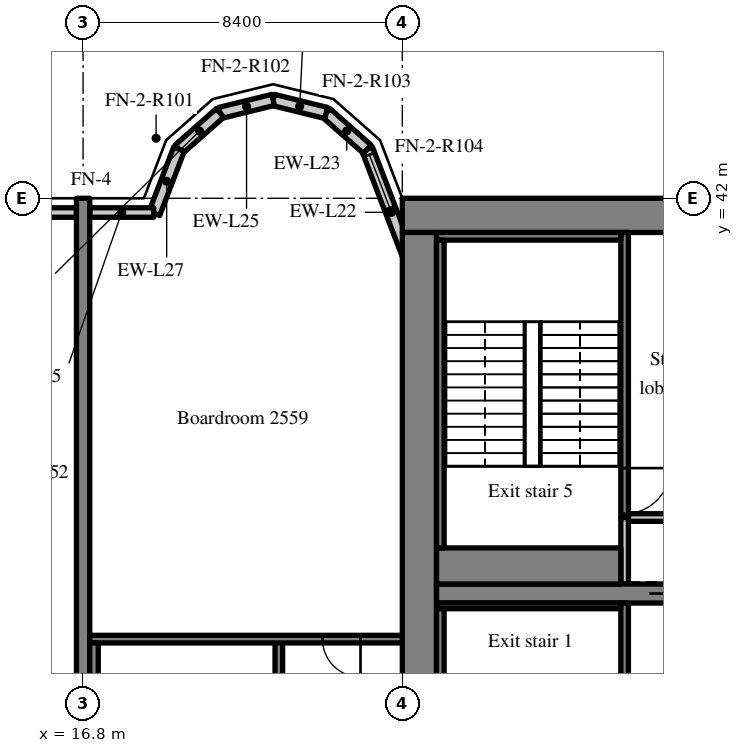
"""IFC4 building model, lengths in metres.
Left out: names, types, materials, properties, quantities, classifications, styles, units other than length and angle.
Written with IfcOpenShell. Run it as: python <this file> out.ifc"""

import sys

from ifc_helpers import new_model, si_unit, direction, frame, frame_2d, origin, place, context, subcontext, project, spatial, rectangle, extrude, source, transform, mapped, element, fill, save


model = new_model("IFC4")
c1 = context("Model", 3, precision=1e-05, world=origin(), true_north=direction((0.0, 1.0)))
c2 = subcontext(c1, "Body", "Model", "MODEL_VIEW")
j1 = project(units=[si_unit("LENGTHUNIT", "METRE"), si_unit("PLANEANGLEUNIT", "RADIAN")], contexts=[c1])
p1 = place(None, origin())
s1 = spatial("IfcSite", under=j1, at=p1, CompositionType="ELEMENT")
p2 = place(p1, origin())
s2 = spatial("IfcBuilding", under=s1, at=p2, CompositionType="ELEMENT")
p3 = place(p2, frame((0.0, 0.0, 106.6)))
s3 = spatial("IfcBuildingStorey", under=s2, at=p3, CompositionType="ELEMENT", Elevation=106.6)
m1 = source(origin(), c2, "Body", "SweptSolid", [
    extrude(rectangle(XDim=50.4, YDim=0.9, at=frame_2d((25.2, 0.0))), origin(), (0.0, 0.0, 1.0), 3.52),
])
p4 = place(p3, frame((25.2, 41.55, 0.0), z_axis=(0.0, 0.0, 1.0), x_axis=(1.0, 0.0, 0.0)))
e1 = element("IfcWall", 1, at=p4, inside=s3, PredefinedType="SHEAR", context=c2, shape_type="MappedRepresentation", body=[
    mapped(m1, transform((0.0, 0.0, 0.0), scale=1.0)),
])
m2 = source(origin(), c2, "Body", "SweptSolid", [
    extrude(rectangle(XDim=18.2, YDim=0.9, at=frame_2d((9.1, 0.0))), origin(), (0.0, 0.0, 1.0), 3.52),
])
p5 = place(p3, frame((25.65, 22.9, 0.0), z_axis=(0.0, 0.0, 1.0), x_axis=(0.0, 1.0, 0.0)))
e2 = element("IfcWall", 2, at=p5, inside=s3, PredefinedType="SHEAR", context=c2, shape_type="MappedRepresentation", body=[
    mapped(m2, transform((0.0, 0.0, 0.0), scale=1.0)),
])
m3 = source(origin(), c2, "Body", "SweptSolid", [
    extrude(rectangle(XDim=7.25, YDim=0.5, at=frame_2d((3.625, 0.0))), origin(), (0.0, 0.0, 1.0), 3.52),
])
p6 = place(p3, frame((26.1, 31.6, 0.0), z_axis=(0.0, 0.0, 1.0), x_axis=(1.0, 0.0, 0.0)))
e3 = element("IfcWall", 3, at=p6, inside=s3, PredefinedType="SHEAR", context=c2, shape_type="MappedRepresentation", body=[
    mapped(m3, transform((0.0, 0.0, 0.0), scale=1.0)),
])
m4 = source(origin(), c2, "Body", "SweptSolid", [
    extrude(rectangle(XDim=1.1, YDim=2.1, at=frame_2d((0.55, 1.05))), frame((0.0, 0.26, 0.0), z_axis=(0.0, -1.0, 0.0), x_axis=(1.0, 0.0, 0.0)), (0.0, 0.0, 1.0), 0.52),
])
p7 = place(p6, frame((5.6, 0.0, 0.0)))
e4 = element("IfcOpeningElement", 4, at=p7, cuts=e3, PredefinedType="OPENING", context=c2, shape_type="MappedRepresentation", body=[
    mapped(m4, transform((0.0, 0.0, 0.0), scale=1.0)),
])
m5 = source(origin(), c2, "Body", "SweptSolid", [
    extrude(rectangle(XDim=20.0, YDim=0.35, at=frame_2d((10.0, 0.0))), origin(), (0.0, 0.0, 1.0), 3.52),
])
p8 = place(p3, frame((16.8, 22.0, 0.0), z_axis=(0.0, 0.0, 1.0), x_axis=(0.0, 1.0, 0.0)))
e5 = element("IfcWall", 5, at=p8, inside=s3, PredefinedType="SHEAR", context=c2, shape_type="MappedRepresentation", body=[
    mapped(m5, transform((0.0, 0.0, 0.0), scale=1.0)),
])
m6 = source(origin(), c2, "Body", "SweptSolid", [
    extrude(rectangle(XDim=3.559, YDim=0.3, at=frame_2d((1.78, 0.0))), origin(), (0.0, 0.0, 1.0), 3.52),
])
p9 = place(p3, frame((25.55, 39.969, 0.0), z_axis=(0.0, 0.0, 1.0), x_axis=(-0.35779745313, 0.933799219604, 0.0)))
e6 = element("IfcWall", 6, at=p9, inside=s3, PredefinedType="SOLIDWALL", context=c2, shape_type="MappedRepresentation", body=[
    mapped(m6, transform((0.0, 0.0, 0.0), scale=1.0)),
])
m7 = source(origin(), c2, "Body", "SweptSolid", [
    extrude(rectangle(XDim=1.5, YDim=2.0, at=frame_2d((0.75, 1.0))), frame((0.0, 0.16, 0.0), z_axis=(0.0, -1.0, 0.0), x_axis=(1.0, 0.0, 0.0)), (0.0, 0.0, 1.0), 0.32),
])
p10 = place(p9, frame((1.903, 0.0, 0.9)))
e7 = element("IfcOpeningElement", 7, at=p10, cuts=e6, PredefinedType="OPENING", context=c2, shape_type="MappedRepresentation", body=[
    mapped(m7, transform((0.0, 0.0, 0.0), scale=1.0)),
])
m8 = source(origin(), c2, "Body", "SweptSolid", [
    extrude(rectangle(XDim=1.44, YDim=0.3, at=frame_2d((0.72, 0.0))), origin(), (0.0, 0.0, 1.0), 3.52),
])
p11 = place(p3, frame((24.277, 43.292, 0.0), z_axis=(0.0, 0.0, 1.0), x_axis=(-0.749649827867, 0.661834673902, 0.0)))
e8 = element("IfcWall", 8, at=p11, inside=s3, PredefinedType="SOLIDWALL", context=c2, shape_type="MappedRepresentation", body=[
    mapped(m8, transform((0.0, 0.0, 0.0), scale=1.0)),
])
m9 = source(origin(), c2, "Body", "SweptSolid", [
    extrude(rectangle(XDim=1.438, YDim=0.3, at=frame_2d((0.719, 0.0))), origin(), (0.0, 0.0, 1.0), 3.52),
])
p12 = place(p3, frame((23.197, 44.245, 0.0), z_axis=(0.0, 0.0, 1.0), x_axis=(-0.971152283879, 0.238460146601, 0.0)))
e9 = element("IfcWall", 9, at=p12, inside=s3, PredefinedType="SOLIDWALL", context=c2, shape_type="MappedRepresentation", body=[
    mapped(m9, transform((0.0, 0.0, 0.0), scale=1.0)),
])
m10 = source(origin(), c2, "Body", "SweptSolid", [
    extrude(rectangle(XDim=1.439, YDim=0.3, at=frame_2d((0.719, 0.0))), origin(), (0.0, 0.0, 1.0), 3.52),
])
p13 = place(p3, frame((21.8, 44.588, 0.0), z_axis=(0.0, 0.0, 1.0), x_axis=(-0.971161932466, -0.238420848351, 0.0)))
e10 = element("IfcWall", 10, at=p13, inside=s3, PredefinedType="SOLIDWALL", context=c2, shape_type="MappedRepresentation", body=[
    mapped(m10, transform((0.0, 0.0, 0.0), scale=1.0)),
])
m11 = source(origin(), c2, "Body", "SweptSolid", [
    extrude(rectangle(XDim=1.44, YDim=0.3, at=frame_2d((0.72, 0.0))), origin(), (0.0, 0.0, 1.0), 3.52),
])
p14 = place(p3, frame((20.403, 44.245, 0.0), z_axis=(0.0, 0.0, 1.0), x_axis=(-0.74957555648, -0.661918790432, 0.0)))
e11 = element("IfcWall", 11, at=p14, inside=s3, PredefinedType="SOLIDWALL", context=c2, shape_type="MappedRepresentation", body=[
    mapped(m11, transform((0.0, 0.0, 0.0), scale=1.0)),
])
m12 = source(origin(), c2, "Body", "SweptSolid", [
    extrude(rectangle(XDim=1.812, YDim=0.3, at=frame_2d((0.906, 0.0))), origin(), (0.0, 0.0, 1.0), 3.52),
])
p15 = place(p3, frame((19.323, 43.292, 0.0), z_axis=(0.0, 0.0, 1.0), x_axis=(-0.357877270961, -0.93376863244, 0.0)))
e12 = element("IfcWall", 12, at=p15, inside=s3, PredefinedType="SOLIDWALL", context=c2, shape_type="MappedRepresentation", body=[
    mapped(m12, transform((0.0, 0.0, 0.0), scale=1.0)),
])
m13 = source(origin(), c2, "Body", "SweptSolid", [
    extrude(rectangle(XDim=3.675, YDim=0.25, at=frame_2d((1.837, 0.0))), origin(), (0.0, 0.0, 1.0), 2.82),
])
p16 = place(p3, frame((16.625, 41.625, 0.0), z_axis=(0.0, 0.0, 1.0), x_axis=(-1.0, 0.0, 0.0)))
e13 = element("IfcWall", 13, at=p16, inside=s3, PredefinedType="SOLIDWALL", context=c2, shape_type="MappedRepresentation", body=[
    mapped(m13, transform((0.0, 0.0, 0.0), scale=1.0)),
])
m14 = source(origin(), c2, "Body", "SweptSolid", [
    extrude(rectangle(XDim=1.5, YDim=1.5, at=frame_2d((0.75, 0.75))), frame((0.0, 0.135, 0.0), z_axis=(0.0, -1.0, 0.0), x_axis=(1.0, 0.0, 0.0)), (0.0, 0.0, 1.0), 0.27),
])
p17 = place(p16, frame((1.087, 0.0, 0.9)))
e14 = element("IfcOpeningElement", 14, at=p17, cuts=e13, PredefinedType="OPENING", context=c2, shape_type="MappedRepresentation", body=[
    mapped(m14, transform((0.0, 0.0, 0.0), scale=1.0)),
])
m15 = source(origin(), c2, "Body", "SweptSolid", [
    extrude(rectangle(XDim=1.683, YDim=0.25, at=frame_2d((0.841, 0.0))), origin(), (0.0, 0.0, 1.0), 2.82),
])
p18 = place(p3, frame((18.658, 41.625, 0.0), z_axis=(0.0, 0.0, 1.0), x_axis=(-1.0, 0.0, 0.0)))
e15 = element("IfcWall", 15, at=p18, inside=s3, PredefinedType="SOLIDWALL", context=c2, shape_type="MappedRepresentation", body=[
    mapped(m15, transform((0.0, 0.0, 0.0), scale=1.0)),
])
m16 = source(origin(), c2, "Body", "SweptSolid", [
    extrude(rectangle(XDim=8.45, YDim=0.2, at=frame_2d((4.225, 0.0))), origin(), (0.0, 0.0, 1.0), 3.52),
])
p19 = place(p3, frame((31.05, 22.9, 0.0), z_axis=(0.0, 0.0, 1.0), x_axis=(0.0, 1.0, 0.0)))
e16 = element("IfcWall", 16, at=p19, inside=s3, PredefinedType="SOLIDWALL", context=c2, shape_type="MappedRepresentation", body=[
    mapped(m16, transform((0.0, 0.0, 0.0), scale=1.0)),
])
m17 = source(origin(), c2, "Body", "SweptSolid", [
    extrude(rectangle(XDim=1.2, YDim=2.1, at=frame_2d((0.6, 1.05))), frame((0.0, 0.11, 0.0), z_axis=(0.0, -1.0, 0.0), x_axis=(1.0, 0.0, 0.0)), (0.0, 0.0, 1.0), 0.22),
])
p20 = place(p19, frame((0.7, 0.0, 0.0)))
e17 = element("IfcOpeningElement", 17, at=p20, cuts=e16, PredefinedType="OPENING", context=c2, shape_type="MappedRepresentation", body=[
    mapped(m17, transform((0.0, 0.0, 0.0), scale=1.0)),
])
m18 = source(origin(), c2, "Body", "SweptSolid", [
    extrude(rectangle(XDim=1.75, YDim=0.2, at=frame_2d((0.875, 0.0))), origin(), (0.0, 0.0, 1.0), 3.52),
])
p21 = place(p3, frame((31.05, 31.85, 0.0), z_axis=(0.0, 0.0, 1.0), x_axis=(0.0, 1.0, 0.0)))
e18 = element("IfcWall", 18, at=p21, inside=s3, PredefinedType="SOLIDWALL", context=c2, shape_type="MappedRepresentation", body=[
    mapped(m18, transform((0.0, 0.0, 0.0), scale=1.0)),
])
m19 = source(origin(), c2, "Body", "SweptSolid", [
    extrude(rectangle(XDim=2.2, YDim=0.2, at=frame_2d((1.1, 0.0))), origin(), (0.0, 0.0, 1.0), 3.52),
])
p22 = place(p3, frame((31.15, 33.6, 0.0), z_axis=(0.0, 0.0, 1.0), x_axis=(1.0, 0.0, 0.0)))
e19 = element("IfcWall", 19, at=p22, inside=s3, PredefinedType="SOLIDWALL", context=c2, shape_type="MappedRepresentation", body=[
    mapped(m19, transform((0.0, 0.0, 0.0), scale=1.0)),
])
m20 = source(origin(), c2, "Body", "SweptSolid", [
    extrude(rectangle(XDim=7.5, YDim=0.2, at=frame_2d((3.75, 0.0))), origin(), (0.0, 0.0, 1.0), 3.52),
])
p23 = place(p3, frame((31.05, 33.6, 0.0), z_axis=(0.0, 0.0, 1.0), x_axis=(0.0, 1.0, 0.0)))
e20 = element("IfcWall", 20, at=p23, inside=s3, PredefinedType="SOLIDWALL", context=c2, shape_type="MappedRepresentation", body=[
    mapped(m20, transform((0.0, 0.0, 0.0), scale=1.0)),
])
p24 = place(p23, frame((0.1, 0.0, 0.0)))
e21 = element("IfcOpeningElement", 21, at=p24, cuts=e20, PredefinedType="OPENING", context=c2, shape_type="MappedRepresentation", body=[
    mapped(m17, transform((0.0, 0.0, 0.0), scale=1.0)),
])
m21 = source(origin(), c2, "Body", "SweptSolid", [
    extrude(rectangle(XDim=8.3, YDim=0.2, at=frame_2d((4.15, 0.0))), origin(), (0.0, 0.0, 1.0), 3.52),
])
p25 = place(p3, frame((21.95, 22.1, 0.0), z_axis=(0.0, 0.0, 1.0), x_axis=(0.0, 1.0, 0.0)))
e22 = element("IfcWall", 22, at=p25, inside=s3, PredefinedType="SOLIDWALL", context=c2, shape_type="MappedRepresentation", body=[
    mapped(m21, transform((0.0, 0.0, 0.0), scale=1.0)),
])
p26 = place(p25, frame((0.6, 0.0, 0.0)))
e23 = element("IfcOpeningElement", 23, at=p26, cuts=e22, PredefinedType="OPENING", context=c2, shape_type="MappedRepresentation", body=[
    mapped(m17, transform((0.0, 0.0, 0.0), scale=1.0)),
])
m22 = source(origin(), c2, "Body", "SweptSolid", [
    extrude(rectangle(XDim=8.225, YDim=0.2, at=frame_2d((4.112, 0.0))), origin(), (0.0, 0.0, 1.0), 3.52),
])
p27 = place(p3, frame((16.975, 30.4, 0.0), z_axis=(0.0, 0.0, 1.0), x_axis=(1.0, 0.0, 0.0)))
e24 = element("IfcWall", 24, at=p27, inside=s3, PredefinedType="SOLIDWALL", context=c2, shape_type="MappedRepresentation", body=[
    mapped(m22, transform((0.0, 0.0, 0.0), scale=1.0)),
])
m23 = source(origin(), c2, "Body", "SweptSolid", [
    extrude(rectangle(XDim=1.0, YDim=2.1, at=frame_2d((0.5, 1.05))), frame((0.0, 0.11, 0.0), z_axis=(0.0, -1.0, 0.0), x_axis=(1.0, 0.0, 0.0)), (0.0, 0.0, 1.0), 0.22),
])
p28 = place(p27, frame((6.125, 0.0, 0.0)))
e25 = element("IfcOpeningElement", 25, at=p28, cuts=e24, PredefinedType="OPENING", context=c2, shape_type="MappedRepresentation", body=[
    mapped(m23, transform((0.0, 0.0, 0.0), scale=1.0)),
])
m24 = source(origin(), c2, "Body", "SweptSolid", [
    extrude(rectangle(XDim=4.85, YDim=0.15, at=frame_2d((2.425, 0.0))), origin(), (0.0, 0.0, 1.0), 3.52),
])
p29 = place(p3, frame((26.1, 31.275, 0.0), z_axis=(0.0, 0.0, 1.0), x_axis=(1.0, 0.0, 0.0)))
e26 = element("IfcWall", 26, at=p29, inside=s3, PredefinedType="SOLIDWALL", context=c2, shape_type="MappedRepresentation", body=[
    mapped(m24, transform((0.0, 0.0, 0.0), scale=1.0)),
])
m25 = source(origin(), c2, "Body", "SweptSolid", [
    extrude(rectangle(XDim=8.1, YDim=0.2, at=frame_2d((4.05, 0.0))), origin(), (0.0, 0.0, 1.0), 3.52),
])
p30 = place(p3, frame((26.2, 23.1, 0.0), z_axis=(0.0, 0.0, 1.0), x_axis=(0.0, 1.0, 0.0)))
e27 = element("IfcWall", 27, at=p30, inside=s3, PredefinedType="SOLIDWALL", context=c2, shape_type="MappedRepresentation", body=[
    mapped(m25, transform((0.0, 0.0, 0.0), scale=1.0)),
])
m26 = source(origin(), c2, "Body", "SweptSolid", [
    extrude(rectangle(XDim=8.1, YDim=0.225, at=frame_2d((4.05, 0.0))), origin(), (0.0, 0.0, 1.0), 3.52),
])
p31 = place(p3, frame((17.087, 22.2, 0.0), z_axis=(0.0, 0.0, 1.0), x_axis=(0.0, 1.0, 0.0)))
e28 = element("IfcWall", 28, at=p31, inside=s3, PredefinedType="SOLIDWALL", context=c2, shape_type="MappedRepresentation", body=[
    mapped(m26, transform((0.0, 0.0, 0.0), scale=1.0)),
])
m27 = source(origin(), c2, "Body", "SweptSolid", [
    extrude(rectangle(XDim=4.85, YDim=0.2, at=frame_2d((2.425, 0.0))), origin(), (0.0, 0.0, 1.0), 3.52),
])
p32 = place(p3, frame((26.1, 41.0, 0.0), z_axis=(0.0, 0.0, 1.0), x_axis=(1.0, 0.0, 0.0)))
e29 = element("IfcWall", 29, at=p32, inside=s3, PredefinedType="SOLIDWALL", context=c2, shape_type="MappedRepresentation", body=[
    mapped(m27, transform((0.0, 0.0, 0.0), scale=1.0)),
])
m28 = source(origin(), c2, "Body", "SweptSolid", [
    extrude(rectangle(XDim=4.85, YDim=0.95, at=frame_2d((2.425, 0.0))), origin(), (0.0, 0.0, 1.0), 3.52),
])
p33 = place(p3, frame((26.1, 32.325, 0.0), z_axis=(0.0, 0.0, 1.0), x_axis=(1.0, 0.0, 0.0)))
e30 = element("IfcWall", 30, at=p33, inside=s3, PredefinedType="SOLIDWALL", context=c2, shape_type="MappedRepresentation", body=[
    mapped(m28, transform((0.0, 0.0, 0.0), scale=1.0)),
])
p34 = place(p3, frame((26.2, 32.8, 0.0), z_axis=(0.0, 0.0, 1.0), x_axis=(0.0, 1.0, 0.0)))
e31 = element("IfcWall", 31, at=p34, inside=s3, PredefinedType="SOLIDWALL", context=c2, shape_type="MappedRepresentation", body=[
    mapped(m25, transform((0.0, 0.0, 0.0), scale=1.0)),
])
m29 = source(origin(), c2, "Body", "SweptSolid", [
    extrude(rectangle(XDim=1.5, YDim=2.0, at=frame_2d((0.75, 1.0))), frame((0.0, 0.03, 0.0), z_axis=(0.0, -1.0, 0.0), x_axis=(1.0, 0.0, 0.0)), (0.0, 0.0, 1.0), 0.06),
])
p35 = place(p10, origin())
e32 = element("IfcWindow", 32, at=p35, inside=s3, PartitioningType="SINGLE_PANEL", PredefinedType="WINDOW", context=c2, shape_type="MappedRepresentation", body=[
    mapped(m29, transform((0.0, 0.0, 0.0), scale=1.0)),
])
fill(e7, e32)
m30 = source(origin(), c2, "Body", "SweptSolid", [
    extrude(rectangle(XDim=1.1, YDim=2.1, at=frame_2d((0.55, 1.05))), frame((0.0, 0.025, 0.0), z_axis=(0.0, -1.0, 0.0), x_axis=(1.0, 0.0, 0.0)), (0.0, 0.0, 1.0), 0.05),
])
p36 = place(p7, origin())
e33 = element("IfcDoor", 33, at=p36, inside=s3, OperationType="SLIDING_TO_RIGHT", PredefinedType="DOOR", context=c2, shape_type="MappedRepresentation", body=[
    mapped(m30, transform((0.0, 0.0, 0.0), scale=1.0)),
])
fill(e4, e33)
m31 = source(origin(), c2, "Body", "SweptSolid", [
    extrude(rectangle(XDim=1.2, YDim=2.1, at=frame_2d((0.6, 1.05))), frame((0.0, 0.025, 0.0), z_axis=(0.0, -1.0, 0.0), x_axis=(1.0, 0.0, 0.0)), (0.0, 0.0, 1.0), 0.05),
])
p37 = place(p24, origin())
e34 = element("IfcDoor", 34, at=p37, inside=s3, OperationType="SINGLE_SWING_RIGHT", PredefinedType="DOOR", context=c2, shape_type="MappedRepresentation", body=[
    mapped(m31, transform((0.0, 0.0, 0.0), scale=1.0)),
])
fill(e21, e34)
m32 = source(origin(), c2, "Body", "SweptSolid", [
    extrude(rectangle(XDim=1.0, YDim=2.1, at=frame_2d((0.5, 1.05))), frame((0.0, 0.025, 0.0), z_axis=(0.0, -1.0, 0.0), x_axis=(1.0, 0.0, 0.0)), (0.0, 0.0, 1.0), 0.05),
])
p38 = place(p28, origin())
e35 = element("IfcDoor", 35, at=p38, inside=s3, OperationType="SINGLE_SWING_RIGHT", PredefinedType="DOOR", context=c2, shape_type="MappedRepresentation", body=[
    mapped(m32, transform((0.0, 0.0, 0.0), scale=1.0)),
])
fill(e25, e35)
save(model, sys.argv[1])
